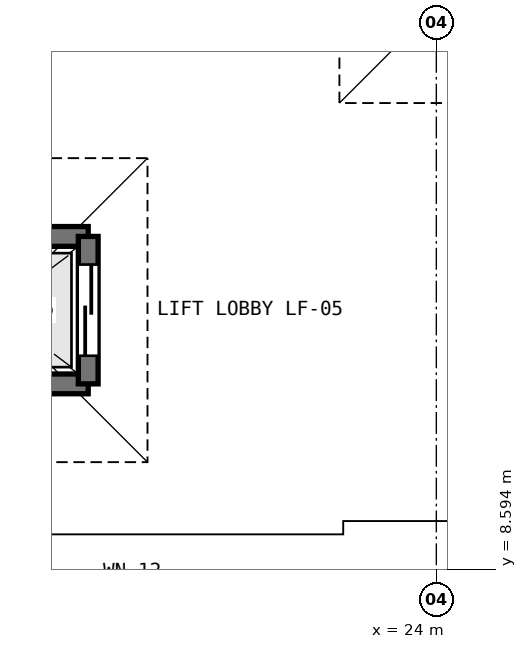
"""IFC4 building model, lengths in metres.
Left out: names, types, materials, properties, quantities, classifications, styles, units other than length and angle.
Written with IfcOpenShell. Run it as: python <this file> out.ifc"""

import sys

from ifc_helpers import new_model, si_unit, direction, frame, frame_2d, origin, place, context, subcontext, project, spatial, rectangle, extrude, element, fill, save


model = new_model("IFC4")
c1 = context("Model", 3, precision=1e-05, world=origin(), true_north=direction((0.0, 1.0)))
c2 = subcontext(c1, "Body", "Model", "MODEL_VIEW")
j1 = project(units=[si_unit("LENGTHUNIT", "METRE"), si_unit("PLANEANGLEUNIT", "RADIAN")], contexts=[c1])
p1 = place(None, origin())
s1 = spatial("IfcSite", under=j1, at=p1, CompositionType="ELEMENT")
p2 = place(p1, origin())
s2 = spatial("IfcBuilding", under=s1, at=p2, CompositionType="ELEMENT")
p3 = place(p2, origin())
s3 = spatial("IfcBuildingStorey", under=s2, at=p3, CompositionType="ELEMENT", Elevation=0.0)
for number, where, z_axis, x_axis in (
    (1, (16.98, 12.97, 0.0), (0.0, 0.0, 1.0), (1.0, 0.0, 0.0)),
    (2, (19.42, 11.03, 0.0), (0.0, 0.0, 1.0), (-1.0, 0.0, 0.0)),
):
    element("IfcWall", number, at=place(p3, frame(where, z_axis=z_axis, x_axis=x_axis)), inside=s3, PredefinedType="SHEAR", context=c2, shape_type="SweptSolid", body=[
        extrude(rectangle(XDim=2.44, YDim=0.26, at=frame_2d((1.22, 0.0))), origin(), (0.0, 0.0, 1.0), 5.08),
    ])
p4 = place(p3, frame((19.42, 12.97, 0.0), z_axis=(0.0, 0.0, 1.0), x_axis=(0.0, -1.0, 0.0)))
e3 = element("IfcWall", 3, at=p4, inside=s3, PredefinedType="SHEAR", context=c2, shape_type="SweptSolid", body=[
    extrude(rectangle(XDim=1.94, YDim=0.26, at=frame_2d((0.97, 0.0))), origin(), (0.0, 0.0, 1.0), 5.08),
])
p5 = place(p4, frame((0.37, 0.0, 0.0)))
e4 = element("IfcOpeningElement", 4, at=p5, cuts=e3, PredefinedType="OPENING", context=c2, shape_type="SweptSolid", body=[
    extrude(rectangle(XDim=1.2, YDim=2.15, at=frame_2d((0.6, 1.075))), frame((0.0, 0.14, 0.0), z_axis=(0.0, -1.0, 0.0), x_axis=(1.0, 0.0, 0.0)), (0.0, 0.0, 1.0), 0.28),
])
p6 = place(p5, origin())
e5 = element("IfcDoor", 5, at=p6, inside=s3, OperationType="SLIDING_TO_LEFT", PredefinedType="DOOR", context=c2, shape_type="SweptSolid", body=[
    extrude(rectangle(XDim=1.2, YDim=2.15, at=frame_2d((0.6, 1.075))), frame((0.0, 0.025, 0.0), z_axis=(0.0, -1.0, 0.0), x_axis=(1.0, 0.0, 0.0)), (0.0, 0.0, 1.0), 0.05),
])
fill(e4, e5)
save(model, sys.argv[1])
